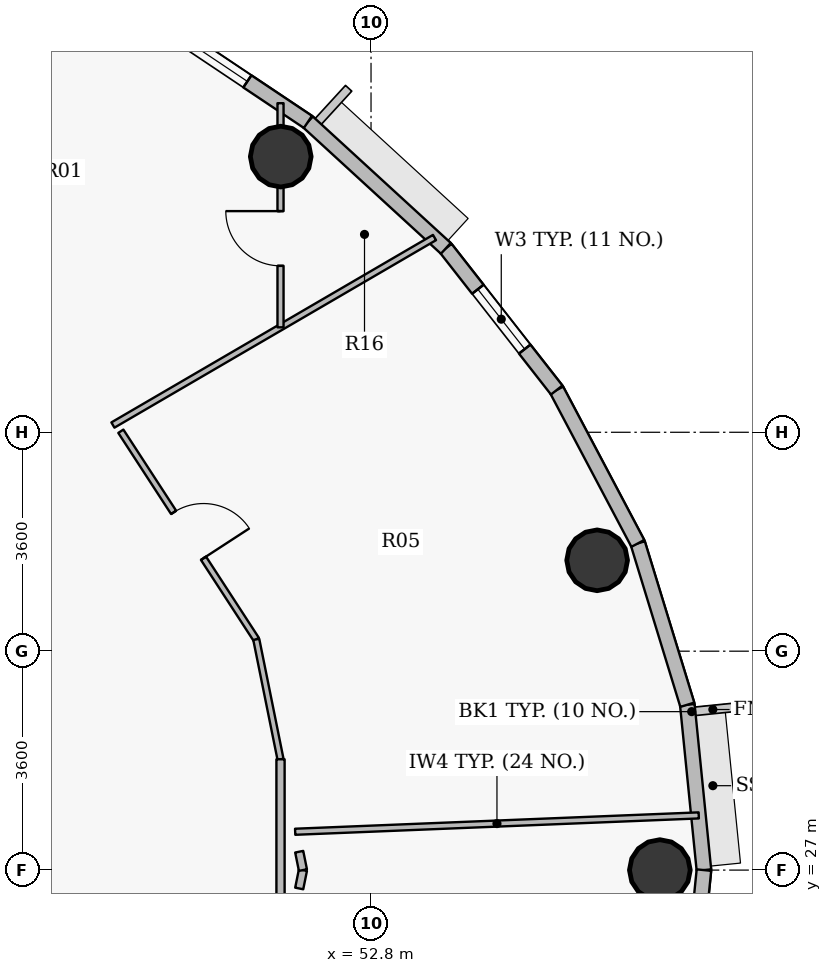
"""IFC4 building model, lengths in metres.
Left out: names, types, materials, properties, quantities, classifications, styles, units other than length and angle.
Written with IfcOpenShell. Run it as: python <this file> out.ifc"""

import sys

from ifc_helpers import new_model, si_unit, direction, frame, frame_2d, origin, origin_2d, place, context, subcontext, project, spatial, rectangle, hollow_circle, extrude, source, transform, mapped, element, fill, save


model = new_model("IFC4")
c1 = context("Model", 3, precision=1e-05, world=origin(), true_north=direction((0.0, 1.0)))
c2 = subcontext(c1, "Body", "Model", "MODEL_VIEW")
j1 = project(units=[si_unit("LENGTHUNIT", "METRE"), si_unit("PLANEANGLEUNIT", "RADIAN")], contexts=[c1])
p1 = place(None, origin())
s1 = spatial("IfcSite", under=j1, at=p1, CompositionType="ELEMENT")
p2 = place(p1, origin())
s2 = spatial("IfcBuilding", under=s1, at=p2, CompositionType="ELEMENT")
p3 = place(p2, frame((0.0, 0.0, 314.25)))
s3 = spatial("IfcBuildingStorey", under=s2, at=p3, CompositionType="ELEMENT", Elevation=314.25)
for number, where, z_axis, x_axis in (
    (1, (57.55, 27.0, 0.0), (0.0, 0.0, 1.0), (1.0, 0.0, 0.0)),
    (2, (56.519, 32.094, 0.0), (0.0, 0.0, 1.0), (1.0, 0.0, 0.0)),
    (3, (51.315, 38.733, 0.0), (0.0, 0.0, 1.0), (1.0, 0.0, 0.0)),
):
    element("IfcColumn", number, at=place(p3, frame(where, z_axis=z_axis, x_axis=x_axis)), inside=s3, PredefinedType="COLUMN", context=c2, shape_type="SweptSolid", body=[
        extrude(hollow_circle(Radius=0.5, WallThickness=0.032, at=origin_2d()), origin(), (0.0, 0.0, 1.0), 3.75),
    ])
p4 = place(p3, frame((58.002, 29.719, 0.0), z_axis=(0.0, 0.0, 1.0), x_axis=(0.099972526841, -0.99499019788, 0.0)))
e4 = element("IfcWall", 4, at=p4, inside=s3, PredefinedType="SOLIDWALL", context=c2, shape_type="SweptSolid", body=[
    extrude(rectangle(XDim=2.733, YDim=0.24, at=frame_2d((1.366, 0.0))), origin(), (0.0, 0.0, 1.0), 3.45),
])
p5 = place(p3, frame((57.188, 32.372, 0.0), z_axis=(0.0, 0.0, 1.0), x_axis=(0.2931213403, -0.956075248012, 0.0)))
e5 = element("IfcWall", 5, at=p5, inside=s3, PredefinedType="SOLIDWALL", context=c2, shape_type="SweptSolid", body=[
    extrude(rectangle(XDim=2.775, YDim=0.24, at=frame_2d((1.388, 0.0))), origin(), (0.0, 0.0, 1.0), 3.45),
])
p6 = place(p3, frame((55.854, 34.895, 0.0), z_axis=(0.0, 0.0, 1.0), x_axis=(0.467628269026, -0.883925224218, 0.0)))
e6 = element("IfcWall", 6, at=p6, inside=s3, PredefinedType="SOLIDWALL", context=c2, shape_type="SweptSolid", body=[
    extrude(rectangle(XDim=2.854, YDim=0.24, at=frame_2d((1.427, 0.0))), origin(), (0.0, 0.0, 1.0), 3.45),
])
p7 = place(p3, frame((54.03, 37.225, 0.0), z_axis=(0.0, 0.0, 1.0), x_axis=(0.616337186556, -0.787482363275, 0.0)))
e7 = element("IfcWall", 7, at=p7, inside=s3, PredefinedType="SOLIDWALL", context=c2, shape_type="SweptSolid", body=[
    extrude(rectangle(XDim=2.958, YDim=0.24, at=frame_2d((1.479, 0.0))), origin(), (0.0, 0.0, 1.0), 3.45),
])
p8 = place(p7, frame((0.854, 0.0, 0.9)))
e8 = element("IfcOpeningElement", 8, at=p8, cuts=e7, PredefinedType="OPENING", context=c2, shape_type="SweptSolid", body=[
    extrude(rectangle(XDim=1.25, YDim=1.65, at=origin_2d()), frame((0.625, 0.13, 0.825), z_axis=(0.0, -1.0, 0.0), x_axis=(1.0, 0.0, 0.0)), (0.0, 0.0, 1.0), 0.26),
])
p9 = place(p3, frame((51.762, 39.304, 0.0), z_axis=(0.0, 0.0, 1.0), x_axis=(0.737068506972, -0.675818034703, 0.0)))
e9 = element("IfcWall", 9, at=p9, inside=s3, PredefinedType="SOLIDWALL", context=c2, shape_type="SweptSolid", body=[
    extrude(rectangle(XDim=3.077, YDim=0.24, at=frame_2d((1.539, 0.0))), origin(), (0.0, 0.0, 1.0), 3.45),
])
p10 = place(p3, frame((49.104, 41.082, 0.0), z_axis=(0.0, 0.0, 1.0), x_axis=(0.831250592635, -0.55589787933, 0.0)))
e10 = element("IfcWall", 10, at=p10, inside=s3, PredefinedType="SOLIDWALL", context=c2, shape_type="SweptSolid", body=[
    extrude(rectangle(XDim=3.197, YDim=0.24, at=frame_2d((1.599, 0.0))), origin(), (0.0, 0.0, 1.0), 3.45),
])
p11 = place(p10, frame((0.749, 0.0, 0.9)))
e11 = element("IfcOpeningElement", 11, at=p11, cuts=e10, PredefinedType="OPENING", context=c2, shape_type="SweptSolid", body=[
    extrude(rectangle(XDim=1.25, YDim=1.65, at=origin_2d()), frame((0.625, 0.13, 0.825), z_axis=(0.0, -1.0, 0.0), x_axis=(1.0, 0.0, 0.0)), (0.0, 0.0, 1.0), 0.26),
])
p12 = place(p3, frame((58.275, 27.0, 0.0), z_axis=(0.0, 0.0, 1.0), x_axis=(-0.099972526841, -0.99499019788, 0.0)))
e12 = element("IfcWall", 12, at=p12, inside=s3, PredefinedType="SOLIDWALL", context=c2, shape_type="SweptSolid", body=[
    extrude(rectangle(XDim=2.733, YDim=0.24, at=frame_2d((1.366, 0.0))), origin(), (0.0, 0.0, 1.0), 3.45),
])
p13 = place(p3, frame((48.555, 34.319, 0.0), z_axis=(0.0, 0.0, 1.0), x_axis=(0.863923501635, 0.503623056783, 0.0)))
e13 = element("IfcWall", 13, at=p13, inside=s3, PredefinedType="PARTITIONING", context=c2, shape_type="SweptSolid", body=[
    extrude(rectangle(XDim=6.122, YDim=0.1, at=frame_2d((3.061, 0.0))), origin(), (0.0, 0.0, 1.0), 2.935),
])
p14 = place(p3, frame((48.685, 34.217, 0.0), z_axis=(0.0, 0.0, 1.0), x_axis=(0.545435886628, -0.838152547916, 0.0)))
e14 = element("IfcWall", 14, at=p14, inside=s3, PredefinedType="PARTITIONING", context=c2, shape_type="SweptSolid", body=[
    extrude(rectangle(XDim=4.083, YDim=0.1, at=frame_2d((2.042, 0.0))), origin(), (0.0, 0.0, 1.0), 2.985),
])
p15 = place(p14, frame((1.592, 0.0, 0.0)))
e15 = element("IfcOpeningElement", 15, at=p15, cuts=e14, PredefinedType="OPENING", context=c2, shape_type="SweptSolid", body=[
    extrude(rectangle(XDim=0.9, YDim=2.1, at=origin_2d()), frame((0.45, 0.06, 1.05), z_axis=(0.0, -1.0, 0.0), x_axis=(1.0, 0.0, 0.0)), (0.0, 0.0, 1.0), 0.12),
])
p16 = place(p3, frame((50.913, 30.794, 0.0), z_axis=(0.0, 0.0, 1.0), x_axis=(0.198192944621, -0.980163025574, 0.0)))
e16 = element("IfcWall", 16, at=p16, inside=s3, PredefinedType="PARTITIONING", context=c2, shape_type="SweptSolid", body=[
    extrude(rectangle(XDim=2.011, YDim=0.1, at=frame_2d((1.006, 0.0))), origin(), (0.0, 0.0, 1.0), 2.985),
])
p17 = place(p3, frame((51.311, 35.926, 0.0), z_axis=(0.0, 0.0, 1.0), x_axis=(0.0, 1.0, 0.0)))
e17 = element("IfcWall", 17, at=p17, inside=s3, PredefinedType="PARTITIONING", context=c2, shape_type="SweptSolid", body=[
    extrude(rectangle(XDim=3.686, YDim=0.1, at=frame_2d((1.843, 0.0))), origin(), (0.0, 0.0, 1.0), 3.45),
])
p18 = place(p17, frame((1.011, 0.0, 0.0)))
e18 = element("IfcOpeningElement", 18, at=p18, cuts=e17, PredefinedType="OPENING", context=c2, shape_type="SweptSolid", body=[
    extrude(rectangle(XDim=0.9, YDim=2.1, at=origin_2d()), frame((0.45, 0.06, 1.05), z_axis=(0.0, -1.0, 0.0), x_axis=(1.0, 0.0, 0.0)), (0.0, 0.0, 1.0), 0.12),
])
p19 = place(p3, frame((51.552, 27.63, 0.0), z_axis=(0.0, 0.0, 1.0), x_axis=(0.999179444864, 0.040502308109, 0.0)))
e19 = element("IfcWall", 19, at=p19, inside=s3, PredefinedType="PARTITIONING", context=c2, shape_type="SweptSolid", body=[
    extrude(rectangle(XDim=6.643, YDim=0.1, at=frame_2d((3.321, 0.0))), origin(), (0.0, 0.0, 1.0), 2.935),
])
p20 = place(p3, frame((51.311, 28.823, 0.0), z_axis=(0.0, 0.0, 1.0), x_axis=(0.0, -1.0, 0.0)))
e20 = element("IfcWall", 20, at=p20, inside=s3, PredefinedType="PARTITIONING", context=c2, shape_type="SweptSolid", body=[
    extrude(rectangle(XDim=3.645, YDim=0.135, at=frame_2d((1.823, 0.0))), origin(), (0.0, 0.0, 1.0), 2.985),
])
for number, where, z_axis, x_axis in (
    (21, (51.619, 26.698, 0.0), (0.0, 0.0, 1.0), (0.198, 0.98, 0.0)),
    (22, (51.68, 27.0, 0.0), (0.0, 0.0, 1.0), (-0.198, 0.98, 0.0)),
):
    element("IfcWall", number, at=place(p3, frame(where, z_axis=z_axis, x_axis=x_axis)), inside=s3, PredefinedType="PARTITIONING", context=c2, shape_type="SweptSolid", body=[
        extrude(rectangle(XDim=0.308, YDim=0.135, at=frame_2d((0.154, 0.0))), origin(), (0.0, 0.0, 1.0), 2.985),
    ])
m1 = source(origin(), c2, "Body", "SweptSolid", [
    extrude(rectangle(XDim=1.25, YDim=1.65, at=origin_2d()), frame((0.625, 0.03, 0.825), z_axis=(0.0, -1.0, 0.0), x_axis=(1.0, 0.0, 0.0)), (0.0, 0.0, 1.0), 0.06),
])
p21 = place(p8, origin())
e23 = element("IfcWindow", 23, at=p21, inside=s3, PartitioningType="SINGLE_PANEL", PredefinedType="WINDOW", context=c2, shape_type="MappedRepresentation", body=[
    mapped(m1, transform((0.0, 0.0, 0.0), x_axis=(1.0, 0.0, 0.0), y_axis=(0.0, 1.0, 0.0), z_axis=(0.0, 0.0, 1.0), scale=1.0)),
])
fill(e8, e23)
p22 = place(p11, origin())
e24 = element("IfcWindow", 24, at=p22, inside=s3, PartitioningType="SINGLE_PANEL", PredefinedType="WINDOW", context=c2, shape_type="MappedRepresentation", body=[
    mapped(m1, transform((0.0, 0.0, 0.0), x_axis=(1.0, 0.0, 0.0), y_axis=(0.0, 1.0, 0.0), z_axis=(0.0, 0.0, 1.0), scale=1.0)),
])
fill(e11, e24)
m2 = source(origin(), c2, "Body", "SweptSolid", [
    extrude(rectangle(XDim=0.9, YDim=2.1, at=origin_2d()), frame((0.45, 0.025, 1.05), z_axis=(0.0, -1.0, 0.0), x_axis=(1.0, 0.0, 0.0)), (0.0, 0.0, 1.0), 0.05),
])
p23 = place(p15, origin())
e25 = element("IfcDoor", 25, at=p23, inside=s3, OperationType="SINGLE_SWING_RIGHT", PredefinedType="DOOR", context=c2, shape_type="MappedRepresentation", body=[
    mapped(m2, transform((0.0, 0.0, 0.0), x_axis=(1.0, 0.0, 0.0), y_axis=(0.0, 1.0, 0.0), z_axis=(0.0, 0.0, 1.0), scale=1.0)),
])
fill(e15, e25)
p24 = place(p18, origin())
e26 = element("IfcDoor", 26, at=p24, inside=s3, OperationType="SINGLE_SWING_RIGHT", PredefinedType="DOOR", context=c2, shape_type="MappedRepresentation", body=[
    mapped(m2, transform((0.0, 0.0, 0.0), x_axis=(1.0, 0.0, 0.0), y_axis=(0.0, 1.0, 0.0), z_axis=(0.0, 0.0, 1.0), scale=1.0)),
])
fill(e18, e26)
save(model, sys.argv[1])
